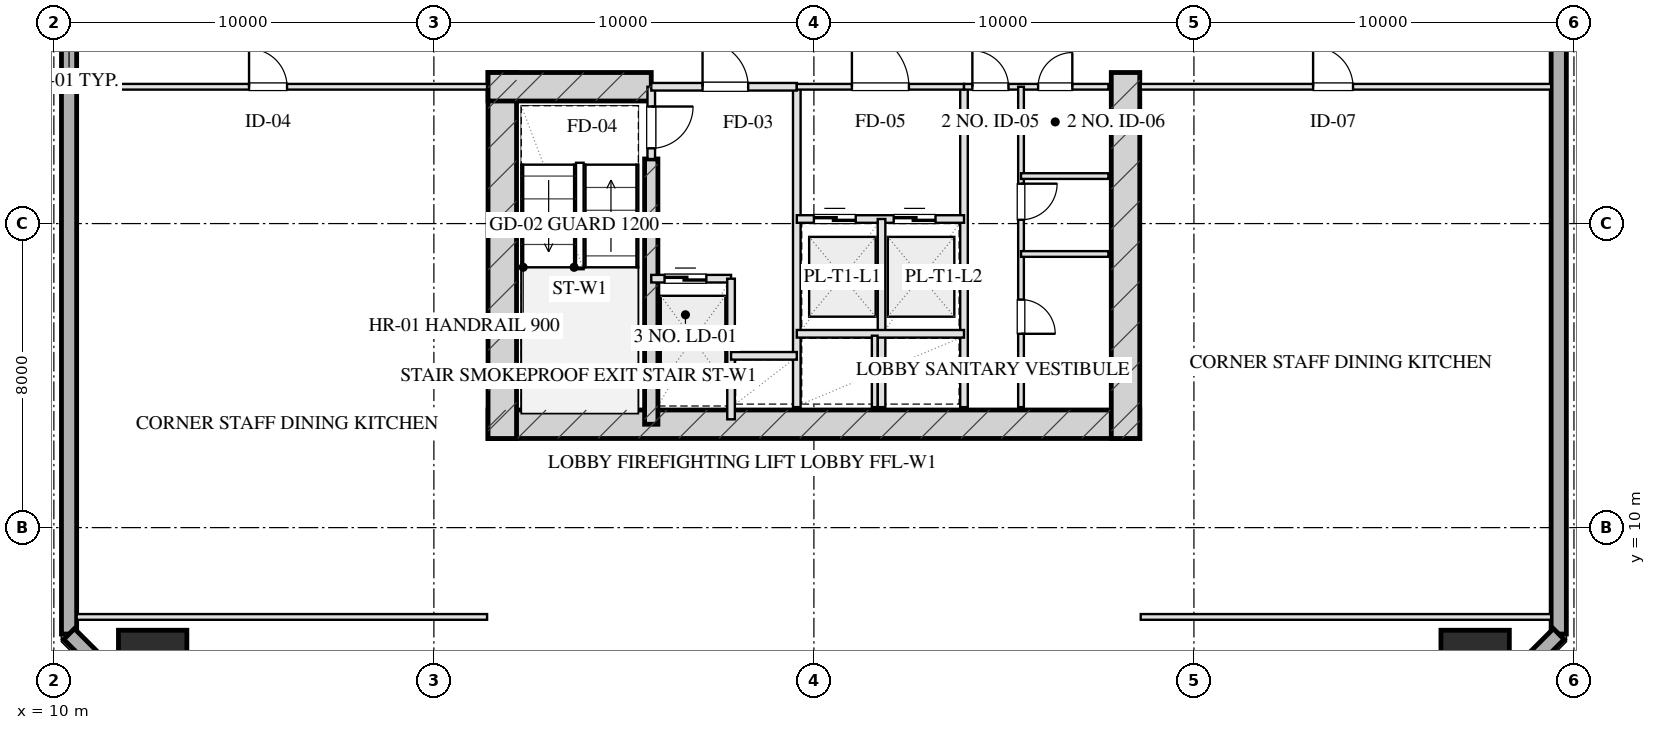
"""IFC4 building model, lengths in metres.
Left out: names, types, materials, properties, quantities, classifications, styles, units other than length and angle.
Written with IfcOpenShell. Run it as: python <this file> out.ifc"""

import sys

from ifc_helpers import new_model, si_unit, direction, frame, frame_2d, origin, origin_2d, place, context, subcontext, project, spatial, rectangle, hollow_rectangle, extrude, element, fill, save


model = new_model("IFC4")
c1 = context("Model", 3, precision=1e-05, world=origin(), true_north=direction((0.0, 1.0)))
c2 = subcontext(c1, "Body", "Model", "MODEL_VIEW")
j1 = project(units=[si_unit("LENGTHUNIT", "METRE"), si_unit("PLANEANGLEUNIT", "RADIAN")], contexts=[c1])
p1 = place(None, origin())
s1 = spatial("IfcSite", under=j1, at=p1, CompositionType="ELEMENT")
p2 = place(p1, origin())
s2 = spatial("IfcBuilding", under=s1, at=p2, CompositionType="ELEMENT")
p3 = place(p2, frame((0.0, 0.0, 71.3)))
s3 = spatial("IfcBuildingStorey", under=s2, at=p3, CompositionType="ELEMENT", Elevation=71.3)
p4 = place(p3, frame((21.425, 12.72, 0.0), z_axis=(0.0, 0.0, 1.0), x_axis=(1.0, 0.0, 0.0)))
e1 = element("IfcWall", 1, at=p4, inside=s3, PredefinedType="SHEAR", context=c2, shape_type="SweptSolid", body=[
    extrude(rectangle(XDim=17.15, YDim=0.75, at=frame_2d((8.575, 0.0))), origin(), (0.0, 0.0, 1.0), 3.45),
])
for number, where, z_axis, x_axis in (
    (2, (21.8, 21.975, 0.0), (0.0, 0.0, 1.0), (0.0, -1.0, 0.0)),
    (3, (38.2, 21.975, 0.0), (0.0, 0.0, 1.0), (0.0, -1.0, 0.0)),
):
    element("IfcWall", number, at=place(p3, frame(where, z_axis=z_axis, x_axis=x_axis)), inside=s3, PredefinedType="SHEAR", context=c2, shape_type="SweptSolid", body=[
        extrude(rectangle(XDim=9.63, YDim=0.75, at=frame_2d((4.815, 0.0))), origin(), (0.0, 0.0, 1.0), 3.45),
    ])
p5 = place(p3, frame((25.72, 19.7, 0.0), z_axis=(0.0, 0.0, 1.0), x_axis=(0.0, -1.0, 0.0)))
e4 = element("IfcWall", 4, at=p5, inside=s3, PredefinedType="SHEAR", context=c2, shape_type="SweptSolid", body=[
    extrude(rectangle(XDim=6.98, YDim=0.35, at=frame_2d((3.49, 0.0))), origin(), (0.0, 0.0, 1.0), 3.45),
])
p6 = place(p3, frame((21.425, 21.6, 0.0), z_axis=(0.0, 0.0, 1.0), x_axis=(1.0, 0.0, 0.0)))
e5 = element("IfcWall", 5, at=p6, inside=s3, PredefinedType="SHEAR", context=c2, shape_type="SweptSolid", body=[
    extrude(rectangle(XDim=4.295, YDim=0.75, at=frame_2d((2.147, 0.0))), origin(), (0.0, 0.0, 1.0), 3.45),
])
for number, where, z_axis, x_axis in (
    (6, (12.6, 6.4, 0.0), (0.0, 0.0, 1.0), (1.0, 0.0, 0.0)),
    (7, (47.4, 6.4, 0.0), (0.0, 0.0, 1.0), (1.0, 0.0, 0.0)),
):
    element("IfcColumn", number, at=place(p3, frame(where, z_axis=z_axis, x_axis=x_axis)), inside=s3, PredefinedType="COLUMN", context=c2, shape_type="SweptSolid", body=[
        extrude(hollow_rectangle(XDim=1.8, YDim=1.8, WallThickness=0.06, at=origin_2d()), origin(), (0.0, 0.0, 1.0), 3.451),
    ])
p7 = place(p3, frame((10.4, 7.2, 0.0), z_axis=(0.0, 0.0, 1.0), x_axis=(0.0, 1.0, 0.0)))
e8 = element("IfcWall", 8, at=p7, inside=s3, PredefinedType="SOLIDWALL", context=c2, shape_type="SweptSolid", body=[
    extrude(rectangle(XDim=53.6, YDim=0.4, at=frame_2d((26.8, 0.0))), origin(), (0.0, 0.0, 1.0), 2.61),
])
p8 = place(p7, frame((19.15, 0.0, 0.75)))
e9 = element("IfcOpeningElement", 9, at=p8, cuts=e8, PredefinedType="OPENING", context=c2, shape_type="SweptSolid", body=[
    extrude(rectangle(XDim=2.5, YDim=1.46, at=frame_2d((1.25, 0.73))), frame((0.0, 0.21, 0.0), z_axis=(0.0, -1.0, 0.0), x_axis=(1.0, 0.0, 0.0)), (0.0, 0.0, 1.0), 0.42),
])
p9 = place(p7, frame((32.05, 0.0, 0.0)))
e10 = element("IfcOpeningElement", 10, at=p9, cuts=e8, PredefinedType="OPENING", context=c2, shape_type="SweptSolid", body=[
    extrude(rectangle(XDim=1.1, YDim=2.15, at=frame_2d((0.55, 1.075))), frame((0.0, 0.21, 0.0), z_axis=(0.0, -1.0, 0.0), x_axis=(1.0, 0.0, 0.0)), (0.0, 0.0, 1.0), 0.42),
])
p10 = place(p3, frame((49.6, 60.8, 0.0), z_axis=(0.0, 0.0, 1.0), x_axis=(0.0, -1.0, 0.0)))
e11 = element("IfcWall", 11, at=p10, inside=s3, PredefinedType="SOLIDWALL", context=c2, shape_type="SweptSolid", body=[
    extrude(rectangle(XDim=53.6, YDim=0.4, at=frame_2d((26.8, 0.0))), origin(), (0.0, 0.0, 1.0), 2.61),
])
p11 = place(p10, frame((28.15, 0.0, 0.75)))
e12 = element("IfcOpeningElement", 12, at=p11, cuts=e11, PredefinedType="OPENING", context=c2, shape_type="SweptSolid", body=[
    extrude(rectangle(XDim=2.5, YDim=1.46, at=frame_2d((1.25, 0.73))), frame((0.0, 0.21, 0.0), z_axis=(0.0, -1.0, 0.0), x_axis=(1.0, 0.0, 0.0)), (0.0, 0.0, 1.0), 0.42),
])
p12 = place(p10, frame((23.15, 0.0, 0.0)))
e13 = element("IfcOpeningElement", 13, at=p12, cuts=e11, PredefinedType="OPENING", context=c2, shape_type="SweptSolid", body=[
    extrude(rectangle(XDim=1.1, YDim=2.15, at=frame_2d((0.55, 1.075))), frame((0.0, 0.21, 0.0), z_axis=(0.0, -1.0, 0.0), x_axis=(1.0, 0.0, 0.0)), (0.0, 0.0, 1.0), 0.42),
])
for number, where, z_axis, x_axis in (
    (14, (49.6, 7.2, 0.0), (0.0, 0.0, 1.0), (-0.707, -0.707, 0.0)),
    (15, (13.4, 4.2, 0.0), (0.0, 0.0, 1.0), (-0.707, 0.707, 0.0)),
):
    element("IfcWall", number, at=place(p3, frame(where, z_axis=z_axis, x_axis=x_axis)), inside=s3, PredefinedType="SOLIDWALL", context=c2, shape_type="SweptSolid", body=[
        extrude(rectangle(XDim=4.243, YDim=0.4, at=frame_2d((2.121, 0.0))), origin(), (0.0, 0.0, 1.0), 2.61),
    ])
p13 = place(p3, frame((25.72, 21.6, 0.0), z_axis=(0.0, 0.0, 1.0), x_axis=(0.0, -1.0, 0.0)))
e16 = element("IfcWall", 16, at=p13, inside=s3, PredefinedType="PARTITIONING", context=c2, shape_type="SweptSolid", body=[
    extrude(rectangle(XDim=1.9, YDim=0.2, at=frame_2d((0.95, 0.0))), origin(), (0.0, 0.0, 1.0), 3.175),
])
p14 = place(p13, frame((0.52, 0.0, 0.0)))
e17 = element("IfcOpeningElement", 17, at=p14, cuts=e16, PredefinedType="OPENING", context=c2, shape_type="SweptSolid", body=[
    extrude(rectangle(XDim=1.1, YDim=2.05, at=frame_2d((0.55, 1.025))), frame((0.0, 0.11, 0.0), z_axis=(0.0, -1.0, 0.0), x_axis=(1.0, 0.0, 0.0)), (0.0, 0.0, 1.0), 0.22),
])
p15 = place(p3, frame((29.55, 21.6, 0.0), z_axis=(0.0, 0.0, 1.0), x_axis=(0.0, -1.0, 0.0)))
e18 = element("IfcWall", 18, at=p15, inside=s3, PredefinedType="PARTITIONING", context=c2, shape_type="SweptSolid", body=[
    extrude(rectangle(XDim=8.43, YDim=0.2, at=frame_2d((4.215, 0.0))), origin(), (0.0, 0.0, 1.0), 3.175),
])
p16 = place(p3, frame((25.72, 21.6, 0.0), z_axis=(0.0, 0.0, 1.0), x_axis=(1.0, 0.0, 0.0)))
e19 = element("IfcWall", 19, at=p16, inside=s3, PredefinedType="PARTITIONING", context=c2, shape_type="SweptSolid", body=[
    extrude(rectangle(XDim=3.83, YDim=0.2, at=frame_2d((1.915, 0.0))), origin(), (0.0, 0.0, 1.0), 3.175),
])
p17 = place(p16, frame((1.35, 0.0, 0.0)))
e20 = element("IfcOpeningElement", 20, at=p17, cuts=e19, PredefinedType="OPENING", context=c2, shape_type="SweptSolid", body=[
    extrude(rectangle(XDim=1.2, YDim=2.05, at=frame_2d((0.6, 1.025))), frame((0.0, 0.11, 0.0), z_axis=(0.0, -1.0, 0.0), x_axis=(1.0, 0.0, 0.0)), (0.0, 0.0, 1.0), 0.22),
])
p18 = place(p3, frame((25.72, 16.55, 0.0), z_axis=(0.0, 0.0, 1.0), x_axis=(1.0, 0.0, 0.0)))
e21 = element("IfcWall", 21, at=p18, inside=s3, PredefinedType="PARTITIONING", context=c2, shape_type="SweptSolid", body=[
    extrude(rectangle(XDim=2.1, YDim=0.2, at=frame_2d((1.05, 0.0))), origin(), (0.0, 0.0, 1.0), 3.175),
])
p19 = place(p18, frame((0.35, 0.0, 0.0)))
e22 = element("IfcOpeningElement", 22, at=p19, cuts=e21, PredefinedType="OPENING", context=c2, shape_type="SweptSolid", body=[
    extrude(rectangle(XDim=1.1, YDim=2.05, at=frame_2d((0.55, 1.025))), frame((0.0, 0.11, 0.0), z_axis=(0.0, -1.0, 0.0), x_axis=(1.0, 0.0, 0.0)), (0.0, 0.0, 1.0), 0.22),
])
p20 = place(p3, frame((27.82, 16.55, 0.0), z_axis=(0.0, 0.0, 1.0), x_axis=(0.0, -1.0, 0.0)))
e23 = element("IfcWall", 23, at=p20, inside=s3, PredefinedType="PARTITIONING", context=c2, shape_type="SweptSolid", body=[
    extrude(rectangle(XDim=3.7, YDim=0.2, at=frame_2d((1.85, 0.0))), origin(), (0.0, 0.0, 1.0), 3.175),
])
p21 = place(p3, frame((27.82, 14.52, 0.0), z_axis=(0.0, 0.0, 1.0), x_axis=(1.0, 0.0, 0.0)))
e24 = element("IfcWall", 24, at=p21, inside=s3, PredefinedType="PARTITIONING", context=c2, shape_type="SweptSolid", body=[
    extrude(rectangle(XDim=1.73, YDim=0.2, at=frame_2d((0.865, 0.0))), origin(), (0.0, 0.0, 1.0), 3.175),
])
p22 = place(p3, frame((33.95, 21.6, 0.0), z_axis=(0.0, 0.0, 1.0), x_axis=(0.0, -1.0, 0.0)))
e25 = element("IfcWall", 25, at=p22, inside=s3, PredefinedType="PARTITIONING", context=c2, shape_type="SweptSolid", body=[
    extrude(rectangle(XDim=8.43, YDim=0.2, at=frame_2d((4.215, 0.0))), origin(), (0.0, 0.0, 1.0), 3.175),
])
p23 = place(p3, frame((29.55, 21.6, 0.0), z_axis=(0.0, 0.0, 1.0), x_axis=(1.0, 0.0, 0.0)))
e26 = element("IfcWall", 26, at=p23, inside=s3, PredefinedType="PARTITIONING", context=c2, shape_type="SweptSolid", body=[
    extrude(rectangle(XDim=4.4, YDim=0.15, at=frame_2d((2.2, 0.0))), origin(), (0.0, 0.0, 1.0), 3.175),
])
p24 = place(p23, frame((1.45, 0.0, 0.0)))
e27 = element("IfcOpeningElement", 27, at=p24, cuts=e26, PredefinedType="OPENING", context=c2, shape_type="SweptSolid", body=[
    extrude(rectangle(XDim=1.5, YDim=2.05, at=frame_2d((0.75, 1.025))), frame((0.0, 0.085, 0.0), z_axis=(0.0, -1.0, 0.0), x_axis=(1.0, 0.0, 0.0)), (0.0, 0.0, 1.0), 0.17),
])
p25 = place(p3, frame((29.55, 18.12, 0.0), z_axis=(0.0, 0.0, 1.0), x_axis=(1.0, 0.0, 0.0)))
e28 = element("IfcWall", 28, at=p25, inside=s3, PredefinedType="PARTITIONING", context=c2, shape_type="SweptSolid", body=[
    extrude(rectangle(XDim=4.4, YDim=0.2, at=frame_2d((2.2, 0.0))), origin(), (0.0, 0.0, 1.0), 3.175),
])
p26 = place(p25, frame((0.45, 0.0, 0.0)))
e29 = element("IfcOpeningElement", 29, at=p26, cuts=e28, PredefinedType="OPENING", context=c2, shape_type="SweptSolid", body=[
    extrude(rectangle(XDim=1.1, YDim=2.05, at=frame_2d((0.55, 1.025))), frame((0.0, 0.11, 0.0), z_axis=(0.0, -1.0, 0.0), x_axis=(1.0, 0.0, 0.0)), (0.0, 0.0, 1.0), 0.22),
])
p27 = place(p25, frame((2.55, 0.0, 0.0)))
e30 = element("IfcOpeningElement", 30, at=p27, cuts=e28, PredefinedType="OPENING", context=c2, shape_type="SweptSolid", body=[
    extrude(rectangle(XDim=1.1, YDim=2.05, at=frame_2d((0.55, 1.025))), frame((0.0, 0.11, 0.0), z_axis=(0.0, -1.0, 0.0), x_axis=(1.0, 0.0, 0.0)), (0.0, 0.0, 1.0), 0.22),
])
p28 = place(p3, frame((31.78, 18.12, 0.0), z_axis=(0.0, 0.0, 1.0), x_axis=(0.0, -1.0, 0.0)))
e31 = element("IfcWall", 31, at=p28, inside=s3, PredefinedType="PARTITIONING", context=c2, shape_type="SweptSolid", body=[
    extrude(rectangle(XDim=4.95, YDim=0.2, at=frame_2d((2.475, 0.0))), origin(), (0.0, 0.0, 1.0), 3.175),
])
p29 = place(p3, frame((29.55, 15.1, 0.0), z_axis=(0.0, 0.0, 1.0), x_axis=(1.0, 0.0, 0.0)))
e32 = element("IfcWall", 32, at=p29, inside=s3, PredefinedType="PARTITIONING", context=c2, shape_type="SweptSolid", body=[
    extrude(rectangle(XDim=4.4, YDim=0.2, at=frame_2d((2.2, 0.0))), origin(), (0.0, 0.0, 1.0), 3.175),
])
p30 = place(p3, frame((31.6, 15.05, 0.0), z_axis=(0.0, 0.0, 1.0), x_axis=(0.0, -1.0, 0.0)))
e33 = element("IfcWall", 33, at=p30, inside=s3, PredefinedType="PARTITIONING", context=c2, shape_type="SweptSolid", body=[
    extrude(rectangle(XDim=1.88, YDim=0.15, at=frame_2d((0.94, 0.0))), origin(), (0.0, 0.0, 1.0), 3.175),
])
p31 = place(p3, frame((33.95, 21.6, 0.0), z_axis=(0.0, 0.0, 1.0), x_axis=(1.0, 0.0, 0.0)))
e34 = element("IfcWall", 34, at=p31, inside=s3, PredefinedType="PARTITIONING", context=c2, shape_type="SweptSolid", body=[
    extrude(rectangle(XDim=3.8, YDim=0.15, at=frame_2d((1.9, 0.0))), origin(), (0.0, 0.0, 1.0), 3.175),
])
p32 = place(p31, frame((0.22, 0.0, 0.0)))
e35 = element("IfcOpeningElement", 35, at=p32, cuts=e34, PredefinedType="OPENING", context=c2, shape_type="SweptSolid", body=[
    extrude(rectangle(XDim=0.95, YDim=2.05, at=frame_2d((0.475, 1.025))), frame((0.0, 0.085, 0.0), z_axis=(0.0, -1.0, 0.0), x_axis=(1.0, 0.0, 0.0)), (0.0, 0.0, 1.0), 0.17),
])
p33 = place(p31, frame((1.95, 0.0, 0.0)))
e36 = element("IfcOpeningElement", 36, at=p33, cuts=e34, PredefinedType="OPENING", context=c2, shape_type="SweptSolid", body=[
    extrude(rectangle(XDim=0.9, YDim=2.05, at=frame_2d((0.45, 1.025))), frame((0.0, 0.085, 0.0), z_axis=(0.0, -1.0, 0.0), x_axis=(1.0, 0.0, 0.0)), (0.0, 0.0, 1.0), 0.17),
])
p34 = place(p3, frame((35.45, 21.6, 0.0), z_axis=(0.0, 0.0, 1.0), x_axis=(0.0, -1.0, 0.0)))
e37 = element("IfcWall", 37, at=p34, inside=s3, PredefinedType="PARTITIONING", context=c2, shape_type="SweptSolid", body=[
    extrude(rectangle(XDim=8.43, YDim=0.15, at=frame_2d((4.215, 0.0))), origin(), (0.0, 0.0, 1.0), 2.815),
])
p35 = place(p34, frame((2.55, 0.0, 0.0)))
e38 = element("IfcOpeningElement", 38, at=p35, cuts=e37, PredefinedType="OPENING", context=c2, shape_type="SweptSolid", body=[
    extrude(rectangle(XDim=0.95, YDim=2.05, at=frame_2d((0.475, 1.025))), frame((0.0, 0.085, 0.0), z_axis=(0.0, -1.0, 0.0), x_axis=(1.0, 0.0, 0.0)), (0.0, 0.0, 1.0), 0.17),
])
p36 = place(p34, frame((5.6, 0.0, 0.0)))
e39 = element("IfcOpeningElement", 39, at=p36, cuts=e37, PredefinedType="OPENING", context=c2, shape_type="SweptSolid", body=[
    extrude(rectangle(XDim=0.9, YDim=2.05, at=frame_2d((0.45, 1.025))), frame((0.0, 0.085, 0.0), z_axis=(0.0, -1.0, 0.0), x_axis=(1.0, 0.0, 0.0)), (0.0, 0.0, 1.0), 0.17),
])
for number, where, z_axis, x_axis in (
    (40, (35.45, 17.2, 0.0), (0.0, 0.0, 1.0), (1.0, 0.0, 0.0)),
    (41, (35.45, 19.25, 0.0), (0.0, 0.0, 1.0), (1.0, 0.0, 0.0)),
):
    element("IfcWall", number, at=place(p3, frame(where, z_axis=z_axis, x_axis=x_axis)), inside=s3, PredefinedType="PARTITIONING", context=c2, shape_type="SweptSolid", body=[
        extrude(rectangle(XDim=2.3, YDim=0.15, at=frame_2d((1.15, 0.0))), origin(), (0.0, 0.0, 1.0), 3.175),
    ])
p37 = place(p3, frame((10.6, 7.65, 0.0), z_axis=(0.0, 0.0, 1.0), x_axis=(1.0, 0.0, 0.0)))
e42 = element("IfcWall", 42, at=p37, inside=s3, PredefinedType="PARTITIONING", context=c2, shape_type="SweptSolid", body=[
    extrude(rectangle(XDim=10.8, YDim=0.15, at=frame_2d((5.4, 0.0))), origin(), (0.0, 0.0, 1.0), 3.175),
])
p38 = place(p3, frame((10.6, 21.6, 0.0), z_axis=(0.0, 0.0, 1.0), x_axis=(1.0, 0.0, 0.0)))
e43 = element("IfcWall", 43, at=p38, inside=s3, PredefinedType="PARTITIONING", context=c2, shape_type="SweptSolid", body=[
    extrude(rectangle(XDim=10.8, YDim=0.15, at=frame_2d((5.4, 0.0))), origin(), (0.0, 0.0, 1.0), 3.175),
])
p39 = place(p38, frame((4.536, 0.0, 0.0)))
e44 = element("IfcOpeningElement", 44, at=p39, cuts=e43, PredefinedType="OPENING", context=c2, shape_type="SweptSolid", body=[
    extrude(rectangle(XDim=1.0, YDim=2.05, at=frame_2d((0.5, 1.025))), frame((0.0, 0.085, 0.0), z_axis=(0.0, -1.0, 0.0), x_axis=(1.0, 0.0, 0.0)), (0.0, 0.0, 1.0), 0.17),
])
p40 = place(p3, frame((38.6, 7.65, 0.0), z_axis=(0.0, 0.0, 1.0), x_axis=(1.0, 0.0, 0.0)))
e45 = element("IfcWall", 45, at=p40, inside=s3, PredefinedType="PARTITIONING", context=c2, shape_type="SweptSolid", body=[
    extrude(rectangle(XDim=10.8, YDim=0.15, at=frame_2d((5.4, 0.0))), origin(), (0.0, 0.0, 1.0), 3.175),
])
p41 = place(p3, frame((38.6, 21.6, 0.0), z_axis=(0.0, 0.0, 1.0), x_axis=(1.0, 0.0, 0.0)))
e46 = element("IfcWall", 46, at=p41, inside=s3, PredefinedType="PARTITIONING", context=c2, shape_type="SweptSolid", body=[
    extrude(rectangle(XDim=10.8, YDim=0.15, at=frame_2d((5.4, 0.0))), origin(), (0.0, 0.0, 1.0), 3.175),
])
p42 = place(p41, frame((4.536, 0.0, 0.0)))
e47 = element("IfcOpeningElement", 47, at=p42, cuts=e46, PredefinedType="OPENING", context=c2, shape_type="SweptSolid", body=[
    extrude(rectangle(XDim=1.05, YDim=2.05, at=frame_2d((0.525, 1.025))), frame((0.0, 0.085, 0.0), z_axis=(0.0, -1.0, 0.0), x_axis=(1.0, 0.0, 0.0)), (0.0, 0.0, 1.0), 0.17),
])
p43 = place(p14, origin())
e48 = element("IfcDoor", 48, at=p43, inside=s3, OperationType="SINGLE_SWING_LEFT", PredefinedType="DOOR", context=c2, shape_type="SweptSolid", body=[
    extrude(rectangle(XDim=1.1, YDim=2.05, at=frame_2d((0.55, 1.025))), frame((0.0, 0.025, 0.0), z_axis=(0.0, -1.0, 0.0), x_axis=(1.0, 0.0, 0.0)), (0.0, 0.0, 1.0), 0.05),
])
fill(e17, e48)
p44 = place(p17, origin())
e49 = element("IfcDoor", 49, at=p44, inside=s3, OperationType="SINGLE_SWING_LEFT", PredefinedType="DOOR", context=c2, shape_type="SweptSolid", body=[
    extrude(rectangle(XDim=1.2, YDim=2.05, at=frame_2d((0.6, 1.025))), frame((0.0, 0.025, 0.0), z_axis=(0.0, -1.0, 0.0), x_axis=(1.0, 0.0, 0.0)), (0.0, 0.0, 1.0), 0.05),
])
fill(e20, e49)
p45 = place(p19, origin())
e50 = element("IfcDoor", 50, at=p45, inside=s3, OperationType="DOUBLE_DOOR_SLIDING", PredefinedType="DOOR", context=c2, shape_type="SweptSolid", body=[
    extrude(rectangle(XDim=1.1, YDim=2.05, at=frame_2d((0.55, 1.025))), frame((0.0, 0.025, 0.0), z_axis=(0.0, -1.0, 0.0), x_axis=(1.0, 0.0, 0.0)), (0.0, 0.0, 1.0), 0.05),
])
fill(e22, e50)
p46 = place(p24, origin())
e51 = element("IfcDoor", 51, at=p46, inside=s3, OperationType="SINGLE_SWING_LEFT", PredefinedType="DOOR", context=c2, shape_type="SweptSolid", body=[
    extrude(rectangle(XDim=1.5, YDim=2.05, at=frame_2d((0.75, 1.025))), frame((0.0, 0.025, 0.0), z_axis=(0.0, -1.0, 0.0), x_axis=(1.0, 0.0, 0.0)), (0.0, 0.0, 1.0), 0.05),
])
fill(e27, e51)
p47 = place(p26, origin())
e52 = element("IfcDoor", 52, at=p47, inside=s3, OperationType="DOUBLE_DOOR_SLIDING", PredefinedType="DOOR", context=c2, shape_type="SweptSolid", body=[
    extrude(rectangle(XDim=1.1, YDim=2.05, at=frame_2d((0.55, 1.025))), frame((0.0, 0.025, 0.0), z_axis=(0.0, -1.0, 0.0), x_axis=(1.0, 0.0, 0.0)), (0.0, 0.0, 1.0), 0.05),
])
fill(e29, e52)
p48 = place(p27, origin())
e53 = element("IfcDoor", 53, at=p48, inside=s3, OperationType="DOUBLE_DOOR_SLIDING", PredefinedType="DOOR", context=c2, shape_type="SweptSolid", body=[
    extrude(rectangle(XDim=1.1, YDim=2.05, at=frame_2d((0.55, 1.025))), frame((0.0, 0.025, 0.0), z_axis=(0.0, -1.0, 0.0), x_axis=(1.0, 0.0, 0.0)), (0.0, 0.0, 1.0), 0.05),
])
fill(e30, e53)
p49 = place(p32, origin())
e54 = element("IfcDoor", 54, at=p49, inside=s3, OperationType="SINGLE_SWING_LEFT", PredefinedType="DOOR", context=c2, shape_type="SweptSolid", body=[
    extrude(rectangle(XDim=0.95, YDim=2.05, at=frame_2d((0.475, 1.025))), frame((0.0, 0.025, 0.0), z_axis=(0.0, -1.0, 0.0), x_axis=(1.0, 0.0, 0.0)), (0.0, 0.0, 1.0), 0.05),
])
fill(e35, e54)
p50 = place(p33, origin())
e55 = element("IfcDoor", 55, at=p50, inside=s3, OperationType="SINGLE_SWING_RIGHT", PredefinedType="DOOR", context=c2, shape_type="SweptSolid", body=[
    extrude(rectangle(XDim=0.9, YDim=2.05, at=frame_2d((0.45, 1.025))), frame((0.0, 0.025, 0.0), z_axis=(0.0, -1.0, 0.0), x_axis=(1.0, 0.0, 0.0)), (0.0, 0.0, 1.0), 0.05),
])
fill(e36, e55)
p51 = place(p35, origin())
e56 = element("IfcDoor", 56, at=p51, inside=s3, OperationType="SINGLE_SWING_LEFT", PredefinedType="DOOR", context=c2, shape_type="SweptSolid", body=[
    extrude(rectangle(XDim=0.95, YDim=2.05, at=frame_2d((0.475, 1.025))), frame((0.0, 0.025, 0.0), z_axis=(0.0, -1.0, 0.0), x_axis=(1.0, 0.0, 0.0)), (0.0, 0.0, 1.0), 0.05),
])
fill(e38, e56)
p52 = place(p36, origin())
e57 = element("IfcDoor", 57, at=p52, inside=s3, OperationType="SINGLE_SWING_RIGHT", PredefinedType="DOOR", context=c2, shape_type="SweptSolid", body=[
    extrude(rectangle(XDim=0.9, YDim=2.05, at=frame_2d((0.45, 1.025))), frame((0.0, 0.025, 0.0), z_axis=(0.0, -1.0, 0.0), x_axis=(1.0, 0.0, 0.0)), (0.0, 0.0, 1.0), 0.05),
])
fill(e39, e57)
p53 = place(p39, origin())
e58 = element("IfcDoor", 58, at=p53, inside=s3, OperationType="SINGLE_SWING_LEFT", PredefinedType="DOOR", context=c2, shape_type="SweptSolid", body=[
    extrude(rectangle(XDim=1.0, YDim=2.05, at=frame_2d((0.5, 1.025))), frame((0.0, 0.025, 0.0), z_axis=(0.0, -1.0, 0.0), x_axis=(1.0, 0.0, 0.0)), (0.0, 0.0, 1.0), 0.05),
])
fill(e44, e58)
p54 = place(p42, origin())
e59 = element("IfcDoor", 59, at=p54, inside=s3, OperationType="SINGLE_SWING_LEFT", PredefinedType="DOOR", context=c2, shape_type="SweptSolid", body=[
    extrude(rectangle(XDim=1.05, YDim=2.05, at=frame_2d((0.525, 1.025))), frame((0.0, 0.025, 0.0), z_axis=(0.0, -1.0, 0.0), x_axis=(1.0, 0.0, 0.0)), (0.0, 0.0, 1.0), 0.05),
])
fill(e47, e59)
save(model, sys.argv[1])
